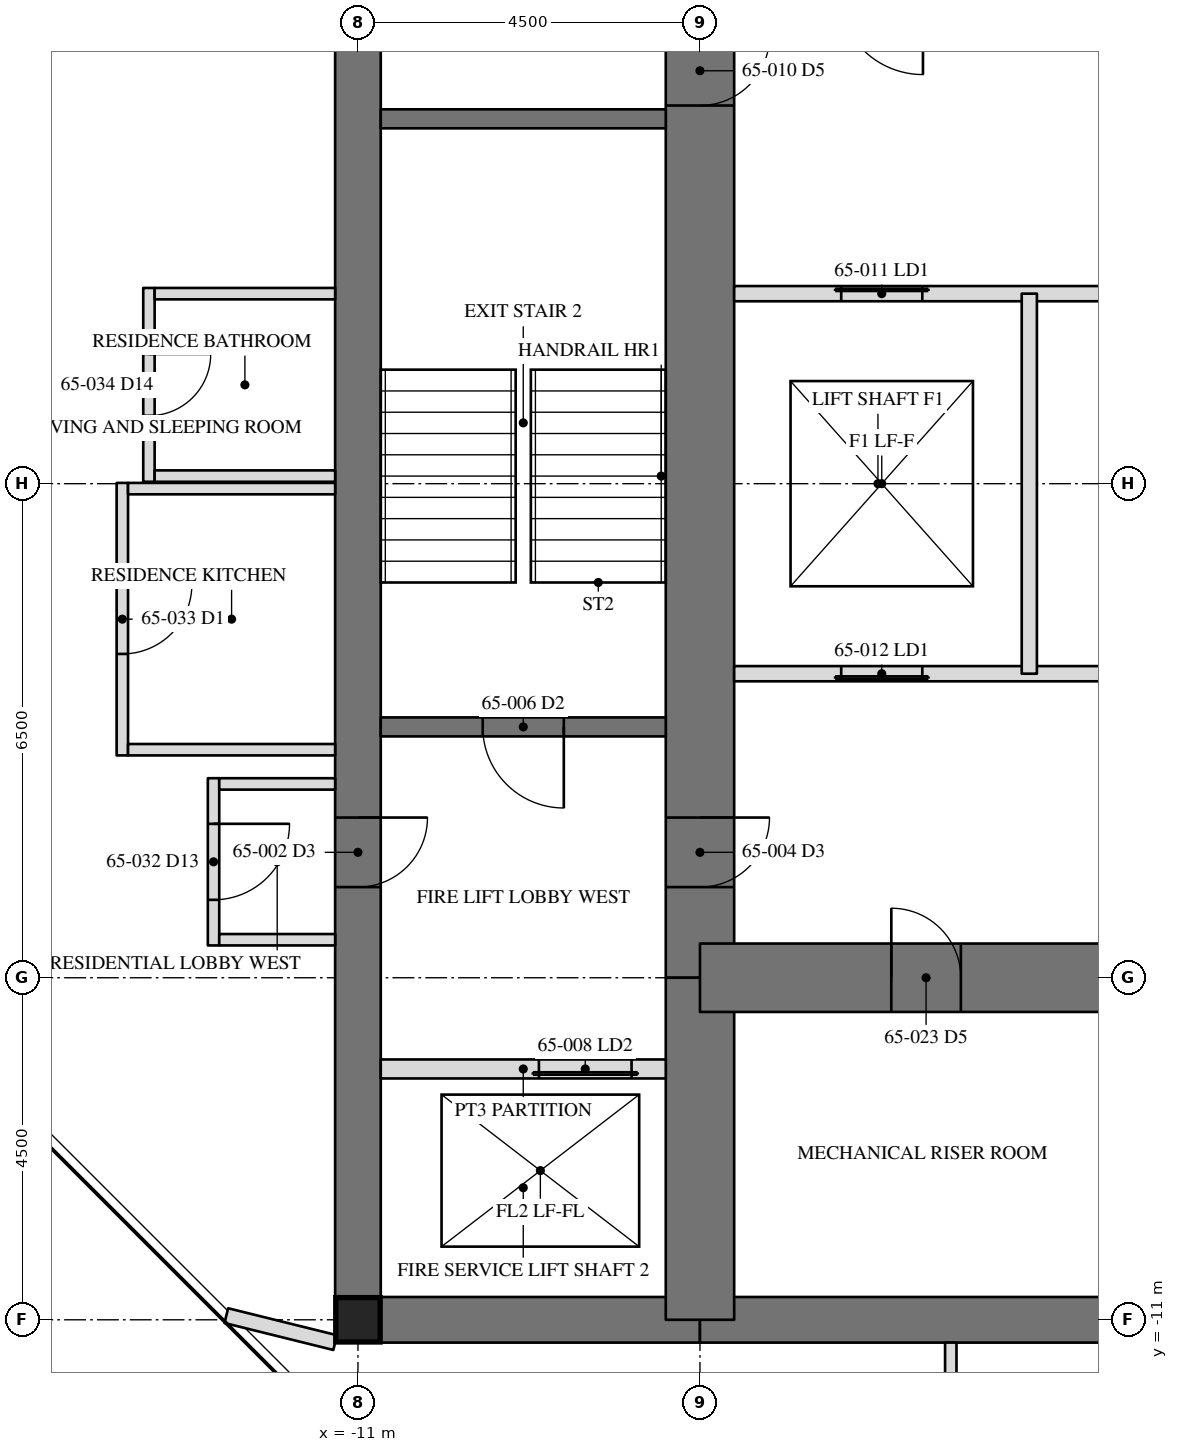
"""IFC4 building model, lengths in metres.
Left out: names, types, materials, properties, quantities, classifications, styles, units other than length and angle.
Written with IfcOpenShell. Run it as: python <this file> out.ifc"""

import sys

from ifc_helpers import new_model, si_unit, direction, frame, frame_2d, origin, origin_2d, place, context, subcontext, project, spatial, rectangle, hollow_rectangle, extrude, element, fill, save


model = new_model("IFC4")
c1 = context("Model", 3, precision=1e-05, world=origin(), true_north=direction((0.0, 1.0)))
c2 = subcontext(c1, "Body", "Model", "MODEL_VIEW")
j1 = project(units=[si_unit("LENGTHUNIT", "METRE"), si_unit("PLANEANGLEUNIT", "RADIAN")], contexts=[c1])
p1 = place(None, origin())
s1 = spatial("IfcSite", under=j1, at=p1, CompositionType="ELEMENT")
p2 = place(p1, origin())
s2 = spatial("IfcBuilding", under=s1, at=p2, CompositionType="ELEMENT")
p3 = place(p2, frame((0.0, 0.0, 266.8)))
s3 = spatial("IfcBuildingStorey", under=s2, at=p3, CompositionType="ELEMENT", Elevation=266.8)
p4 = place(p3, frame((-11.0, 11.0, 0.0), z_axis=(0.0, 0.0, 1.0), x_axis=(0.0, -1.0, 0.0)))
e1 = element("IfcWall", 1, at=p4, inside=s3, PredefinedType="SHEAR", context=c2, shape_type="SweptSolid", body=[
    extrude(rectangle(XDim=22.0, YDim=0.6, at=frame_2d((11.0, 0.0))), origin(), (0.0, 0.0, 1.0), 3.6),
])
p5 = place(p4, frame((15.393, 0.0, 0.0)))
e2 = element("IfcOpeningElement", 2, at=p5, cuts=e1, PredefinedType="OPENING", context=c2, shape_type="SweptSolid", body=[
    extrude(rectangle(XDim=0.915, YDim=2.134, at=frame_2d((0.458, 1.067))), frame((0.0, 0.31, 0.0), z_axis=(0.0, -1.0, 0.0), x_axis=(1.0, 0.0, 0.0)), (0.0, 0.0, 1.0), 0.62),
])
p6 = place(p3, frame((-11.0, -11.0, 0.0), z_axis=(0.0, 0.0, 1.0), x_axis=(1.0, 0.0, 0.0)))
e3 = element("IfcWall", 3, at=p6, inside=s3, PredefinedType="SHEAR", context=c2, shape_type="SweptSolid", body=[
    extrude(rectangle(XDim=4.5, YDim=0.6, at=frame_2d((2.25, 0.0))), origin(), (0.0, 0.0, 1.0), 3.6),
])
p7 = place(p3, frame((-6.5, -11.0, 0.0), z_axis=(0.0, 0.0, 1.0), x_axis=(1.0, 0.0, 0.0)))
e4 = element("IfcWall", 4, at=p7, inside=s3, PredefinedType="SHEAR", context=c2, shape_type="SweptSolid", body=[
    extrude(rectangle(XDim=13.0, YDim=0.6, at=frame_2d((6.5, 0.0))), origin(), (0.0, 0.0, 1.0), 3.6),
])
p8 = place(p7, frame((6.0, 0.0, 0.0)))
e5 = element("IfcOpeningElement", 5, at=p8, cuts=e4, PredefinedType="OPENING", context=c2, shape_type="SweptSolid", body=[
    extrude(rectangle(XDim=1.0, YDim=2.134, at=frame_2d((0.5, 1.067))), frame((0.0, 0.31, 0.0), z_axis=(0.0, -1.0, 0.0), x_axis=(1.0, 0.0, 0.0)), (0.0, 0.0, 1.0), 0.62),
])
p9 = place(p3, frame((-6.5, 6.5, 0.0), z_axis=(0.0, 0.0, 1.0), x_axis=(0.0, -1.0, 0.0)))
e6 = element("IfcWall", 6, at=p9, inside=s3, PredefinedType="SHEAR", context=c2, shape_type="SweptSolid", body=[
    extrude(rectangle(XDim=13.0, YDim=0.9, at=frame_2d((6.5, 0.0))), origin(), (0.0, 0.0, 1.0), 3.6),
])
p10 = place(p9, frame((10.893, 0.0, 0.0)))
e7 = element("IfcOpeningElement", 7, at=p10, cuts=e6, PredefinedType="OPENING", context=c2, shape_type="SweptSolid", body=[
    extrude(rectangle(XDim=0.915, YDim=2.134, at=frame_2d((0.458, 1.067))), frame((0.0, 0.46, 0.0), z_axis=(0.0, -1.0, 0.0), x_axis=(1.0, 0.0, 0.0)), (0.0, 0.0, 1.0), 0.92),
])
p11 = place(p9, frame((0.61, 0.0, 0.0)))
e8 = element("IfcOpeningElement", 8, at=p11, cuts=e6, PredefinedType="OPENING", context=c2, shape_type="SweptSolid", body=[
    extrude(rectangle(XDim=0.915, YDim=2.134, at=frame_2d((0.458, 1.067))), frame((0.0, 0.46, 0.0), z_axis=(0.0, -1.0, 0.0), x_axis=(1.0, 0.0, 0.0)), (0.0, 0.0, 1.0), 0.92),
])
p12 = place(p3, frame((-6.5, -6.5, 0.0), z_axis=(0.0, 0.0, 1.0), x_axis=(0.0, -1.0, 0.0)))
e9 = element("IfcWall", 9, at=p12, inside=s3, PredefinedType="SHEAR", context=c2, shape_type="SweptSolid", body=[
    extrude(rectangle(XDim=4.5, YDim=0.9, at=frame_2d((2.25, 0.0))), origin(), (0.0, 0.0, 1.0), 3.6),
])
p13 = place(p3, frame((-6.5, -6.5, 0.0), z_axis=(0.0, 0.0, 1.0), x_axis=(1.0, 0.0, 0.0)))
e10 = element("IfcWall", 10, at=p13, inside=s3, PredefinedType="SHEAR", context=c2, shape_type="SweptSolid", body=[
    extrude(rectangle(XDim=13.0, YDim=0.9, at=frame_2d((6.5, 0.0))), origin(), (0.0, 0.0, 1.0), 3.6),
])
p14 = place(p13, frame((6.042, 0.0, 0.0)))
e11 = element("IfcOpeningElement", 11, at=p14, cuts=e10, PredefinedType="OPENING", context=c2, shape_type="SweptSolid", body=[
    extrude(rectangle(XDim=0.915, YDim=2.134, at=frame_2d((0.458, 1.067))), frame((0.0, 0.46, 0.0), z_axis=(0.0, -1.0, 0.0), x_axis=(1.0, 0.0, 0.0)), (0.0, 0.0, 1.0), 0.92),
])
p15 = place(p13, frame((2.518, 0.0, 0.0)))
e12 = element("IfcOpeningElement", 12, at=p15, cuts=e10, PredefinedType="OPENING", context=c2, shape_type="SweptSolid", body=[
    extrude(rectangle(XDim=0.915, YDim=2.134, at=frame_2d((0.458, 1.067))), frame((0.0, 0.46, 0.0), z_axis=(0.0, -1.0, 0.0), x_axis=(1.0, 0.0, 0.0)), (0.0, 0.0, 1.0), 0.92),
])
p16 = place(p13, frame((10.167, 0.0, 0.0)))
e13 = element("IfcOpeningElement", 13, at=p16, cuts=e10, PredefinedType="OPENING", context=c2, shape_type="SweptSolid", body=[
    extrude(rectangle(XDim=0.915, YDim=2.134, at=frame_2d((0.458, 1.067))), frame((0.0, 0.46, 0.0), z_axis=(0.0, -1.0, 0.0), x_axis=(1.0, 0.0, 0.0)), (0.0, 0.0, 1.0), 0.92),
])
p17 = place(p3, frame((-11.0, -11.0, 0.0), z_axis=(0.0, 0.0, 1.0), x_axis=(1.0, 0.0, 0.0)))
e14 = element("IfcColumn", 14, at=p17, inside=s3, PredefinedType="COLUMN", context=c2, shape_type="SweptSolid", body=[
    extrude(hollow_rectangle(XDim=0.584, YDim=0.584, WallThickness=0.051, at=origin_2d()), origin(), (0.0, 0.0, 1.0), 3.6),
])
p18 = place(p3, frame((-6.95, 4.8, 0.0), z_axis=(0.0, 0.0, 1.0), x_axis=(-1.0, 0.0, 0.0)))
e15 = element("IfcWall", 15, at=p18, inside=s3, PredefinedType="SOLIDWALL", context=c2, shape_type="SweptSolid", body=[
    extrude(rectangle(XDim=3.75, YDim=0.25, at=frame_2d((1.875, 0.0))), origin(), (0.0, 0.0, 1.0), 3.41),
])
p19 = place(p3, frame((-6.95, -3.2, 0.0), z_axis=(0.0, 0.0, 1.0), x_axis=(-1.0, 0.0, 0.0)))
e16 = element("IfcWall", 16, at=p19, inside=s3, PredefinedType="SOLIDWALL", context=c2, shape_type="SweptSolid", body=[
    extrude(rectangle(XDim=3.75, YDim=0.25, at=frame_2d((1.875, 0.0))), origin(), (0.0, 0.0, 1.0), 3.41),
])
p20 = place(p19, frame((1.342, 0.0, 0.0)))
e17 = element("IfcOpeningElement", 17, at=p20, cuts=e16, PredefinedType="OPENING", context=c2, shape_type="SweptSolid", body=[
    extrude(rectangle(XDim=1.067, YDim=2.134, at=frame_2d((0.533, 1.067))), frame((0.0, 0.135, 0.0), z_axis=(0.0, -1.0, 0.0), x_axis=(1.0, 0.0, 0.0)), (0.0, 0.0, 1.0), 0.27),
])
p21 = place(p3, frame((-6.95, -7.7, 0.0), z_axis=(0.0, 0.0, 1.0), x_axis=(-1.0, 0.0, 0.0)))
e18 = element("IfcWall", 18, at=p21, inside=s3, PredefinedType="PARTITIONING", context=c2, shape_type="SweptSolid", body=[
    extrude(rectangle(XDim=3.75, YDim=0.25, at=frame_2d((1.875, 0.0))), origin(), (0.0, 0.0, 1.0), 3.41),
])
p22 = place(p21, frame((0.45, 0.0, 0.0)))
e19 = element("IfcOpeningElement", 19, at=p22, cuts=e18, PredefinedType="OPENING", context=c2, shape_type="SweptSolid", body=[
    extrude(rectangle(XDim=1.219, YDim=2.134, at=frame_2d((0.609, 1.067))), frame((0.0, 0.135, 0.0), z_axis=(0.0, -1.0, 0.0), x_axis=(1.0, 0.0, 0.0)), (0.0, 0.0, 1.0), 0.27),
])
p23 = place(p3, frame((-6.05, 2.5, 0.0), z_axis=(0.0, 0.0, 1.0), x_axis=(1.0, 0.0, 0.0)))
e20 = element("IfcWall", 20, at=p23, inside=s3, PredefinedType="PARTITIONING", context=c2, shape_type="SweptSolid", body=[
    extrude(rectangle(XDim=12.1, YDim=0.2, at=frame_2d((6.05, 0.0))), origin(), (0.0, 0.0, 1.0), 3.41),
])
p24 = place(p23, frame((1.408, 0.0, 0.0)))
e21 = element("IfcOpeningElement", 21, at=p24, cuts=e20, PredefinedType="OPENING", context=c2, shape_type="SweptSolid", body=[
    extrude(rectangle(XDim=1.067, YDim=2.134, at=frame_2d((0.533, 1.067))), frame((0.0, 0.11, 0.0), z_axis=(0.0, -1.0, 0.0), x_axis=(1.0, 0.0, 0.0)), (0.0, 0.0, 1.0), 0.22),
])
p25 = place(p23, frame((5.517, 0.0, 0.0)))
e22 = element("IfcOpeningElement", 22, at=p25, cuts=e20, PredefinedType="OPENING", context=c2, shape_type="SweptSolid", body=[
    extrude(rectangle(XDim=1.067, YDim=2.134, at=frame_2d((0.533, 1.067))), frame((0.0, 0.11, 0.0), z_axis=(0.0, -1.0, 0.0), x_axis=(1.0, 0.0, 0.0)), (0.0, 0.0, 1.0), 0.22),
])
p26 = place(p23, frame((9.625, 0.0, 0.0)))
e23 = element("IfcOpeningElement", 23, at=p26, cuts=e20, PredefinedType="OPENING", context=c2, shape_type="SweptSolid", body=[
    extrude(rectangle(XDim=1.067, YDim=2.134, at=frame_2d((0.533, 1.067))), frame((0.0, 0.11, 0.0), z_axis=(0.0, -1.0, 0.0), x_axis=(1.0, 0.0, 0.0)), (0.0, 0.0, 1.0), 0.22),
])
p27 = place(p3, frame((6.05, -2.5, 0.0), z_axis=(0.0, 0.0, 1.0), x_axis=(-1.0, 0.0, 0.0)))
e24 = element("IfcWall", 24, at=p27, inside=s3, PredefinedType="PARTITIONING", context=c2, shape_type="SweptSolid", body=[
    extrude(rectangle(XDim=12.1, YDim=0.2, at=frame_2d((6.05, 0.0))), origin(), (0.0, 0.0, 1.0), 3.41),
])
p28 = place(p27, frame((9.625, 0.0, 0.0)))
e25 = element("IfcOpeningElement", 25, at=p28, cuts=e24, PredefinedType="OPENING", context=c2, shape_type="SweptSolid", body=[
    extrude(rectangle(XDim=1.067, YDim=2.134, at=frame_2d((0.533, 1.067))), frame((0.0, 0.11, 0.0), z_axis=(0.0, -1.0, 0.0), x_axis=(1.0, 0.0, 0.0)), (0.0, 0.0, 1.0), 0.22),
])
p29 = place(p27, frame((5.517, 0.0, 0.0)))
e26 = element("IfcOpeningElement", 26, at=p29, cuts=e24, PredefinedType="OPENING", context=c2, shape_type="SweptSolid", body=[
    extrude(rectangle(XDim=1.067, YDim=2.134, at=frame_2d((0.533, 1.067))), frame((0.0, 0.11, 0.0), z_axis=(0.0, -1.0, 0.0), x_axis=(1.0, 0.0, 0.0)), (0.0, 0.0, 1.0), 0.22),
])
p30 = place(p27, frame((1.408, 0.0, 0.0)))
e27 = element("IfcOpeningElement", 27, at=p30, cuts=e24, PredefinedType="OPENING", context=c2, shape_type="SweptSolid", body=[
    extrude(rectangle(XDim=1.067, YDim=2.134, at=frame_2d((0.533, 1.067))), frame((0.0, 0.11, 0.0), z_axis=(0.0, -1.0, 0.0), x_axis=(1.0, 0.0, 0.0)), (0.0, 0.0, 1.0), 0.22),
])
p31 = place(p3, frame((-2.167, -2.5, 0.0), z_axis=(0.0, 0.0, 1.0), x_axis=(0.0, 1.0, 0.0)))
e28 = element("IfcWall", 28, at=p31, inside=s3, PredefinedType="PARTITIONING", context=c2, shape_type="SweptSolid", body=[
    extrude(rectangle(XDim=5.0, YDim=0.2, at=frame_2d((2.5, 0.0))), origin(), (0.0, 0.0, 1.0), 3.41),
])
p32 = place(p3, frame((-11.3, -11.3, 0.0), z_axis=(0.0, 0.0, 1.0), x_axis=(-0.970646702169, 0.24050983258, 0.0)))
e29 = element("IfcWall", 29, at=p32, inside=s3, PredefinedType="PARTITIONING", context=c2, shape_type="SweptSolid", body=[
    extrude(rectangle(XDim=1.475, YDim=0.2, at=frame_2d((0.737, 0.0))), origin(), (0.0, 0.0, 1.0), 3.41),
])
p33 = place(p3, frame((-12.9, -3.875, 0.0), z_axis=(0.0, 0.0, 1.0), x_axis=(0.0, -1.0, 0.0)))
e30 = element("IfcWall", 30, at=p33, inside=s3, PredefinedType="PARTITIONING", context=c2, shape_type="SweptSolid", body=[
    extrude(rectangle(XDim=2.2, YDim=0.15, at=frame_2d((1.1, 0.0))), origin(), (0.0, 0.0, 1.0), 3.41),
])
p34 = place(p33, frame((0.6, 0.0, 0.0)))
e31 = element("IfcOpeningElement", 31, at=p34, cuts=e30, PredefinedType="OPENING", context=c2, shape_type="SweptSolid", body=[
    extrude(rectangle(XDim=1.0, YDim=2.134, at=frame_2d((0.5, 1.067))), frame((0.0, 0.085, 0.0), z_axis=(0.0, -1.0, 0.0), x_axis=(1.0, 0.0, 0.0)), (0.0, 0.0, 1.0), 0.17),
])
for number, where, z_axis, x_axis in (
    (32, (-11.3, -3.95, 0.0), (0.0, 0.0, 1.0), (-1.0, 0.0, 0.0)),
    (33, (-11.3, -6.0, 0.0), (0.0, 0.0, 1.0), (-1.0, 0.0, 0.0)),
):
    element("IfcWall", number, at=place(p3, frame(where, z_axis=z_axis, x_axis=x_axis)), inside=s3, PredefinedType="PARTITIONING", context=c2, shape_type="SweptSolid", body=[
        extrude(rectangle(XDim=1.525, YDim=0.15, at=frame_2d((0.762, 0.0))), origin(), (0.0, 0.0, 1.0), 3.41),
    ])
p35 = place(p3, frame((-14.1, 0.01, 0.0), z_axis=(0.0, 0.0, 1.0), x_axis=(0.0, -1.0, 0.0)))
e34 = element("IfcWall", 34, at=p35, inside=s3, PredefinedType="PARTITIONING", context=c2, shape_type="SweptSolid", body=[
    extrude(rectangle(XDim=3.585, YDim=0.15, at=frame_2d((1.792, 0.0))), origin(), (0.0, 0.0, 1.0), 3.41),
])
p36 = place(p35, frame((1.335, 0.0, 0.0)))
e35 = element("IfcOpeningElement", 35, at=p36, cuts=e34, PredefinedType="OPENING", context=c2, shape_type="SweptSolid", body=[
    extrude(rectangle(XDim=0.915, YDim=2.134, at=frame_2d((0.458, 1.067))), frame((0.0, 0.085, 0.0), z_axis=(0.0, -1.0, 0.0), x_axis=(1.0, 0.0, 0.0)), (0.0, 0.0, 1.0), 0.17),
])
p37 = place(p3, frame((-11.3, -0.065, 0.0), z_axis=(0.0, 0.0, 1.0), x_axis=(-1.0, 0.0, 0.0)))
e36 = element("IfcWall", 36, at=p37, inside=s3, PredefinedType="PARTITIONING", context=c2, shape_type="SweptSolid", body=[
    extrude(rectangle(XDim=2.725, YDim=0.15, at=frame_2d((1.362, 0.0))), origin(), (0.0, 0.0, 1.0), 2.709),
])
p38 = place(p3, frame((-11.3, -3.5, 0.0), z_axis=(0.0, 0.0, 1.0), x_axis=(-1.0, 0.0, 0.0)))
e37 = element("IfcWall", 37, at=p38, inside=s3, PredefinedType="PARTITIONING", context=c2, shape_type="SweptSolid", body=[
    extrude(rectangle(XDim=2.725, YDim=0.15, at=frame_2d((1.362, 0.0))), origin(), (0.0, 0.0, 1.0), 3.41),
])
p39 = place(p3, frame((-13.75, 2.575, 0.0), z_axis=(0.0, 0.0, 1.0), x_axis=(0.0, -1.0, 0.0)))
e38 = element("IfcWall", 38, at=p39, inside=s3, PredefinedType="PARTITIONING", context=c2, shape_type="SweptSolid", body=[
    extrude(rectangle(XDim=2.55, YDim=0.15, at=frame_2d((1.275, 0.0))), origin(), (0.0, 0.0, 1.0), 3.41),
])
p40 = place(p39, frame((0.868, 0.0, 0.0)))
e39 = element("IfcOpeningElement", 39, at=p40, cuts=e38, PredefinedType="OPENING", context=c2, shape_type="SweptSolid", body=[
    extrude(rectangle(XDim=0.813, YDim=2.032, at=frame_2d((0.406, 1.016))), frame((0.0, 0.085, 0.0), z_axis=(0.0, -1.0, 0.0), x_axis=(1.0, 0.0, 0.0)), (0.0, 0.0, 1.0), 0.17),
])
p41 = place(p3, frame((-11.3, 2.5, 0.0), z_axis=(0.0, 0.0, 1.0), x_axis=(-1.0, 0.0, 0.0)))
e40 = element("IfcWall", 40, at=p41, inside=s3, PredefinedType="PARTITIONING", context=c2, shape_type="SweptSolid", body=[
    extrude(rectangle(XDim=2.375, YDim=0.15, at=frame_2d((1.188, 0.0))), origin(), (0.0, 0.0, 1.0), 3.41),
])
for number, where, z_axis, x_axis in (
    (41, (-11.3, 0.1, 0.0), (0.0, 0.0, 1.0), (-1.0, 0.0, 0.0)),
    (42, (-3.2, -11.3, 0.0), (0.0, 0.0, 1.0), (0.0, -1.0, 0.0)),
):
    element("IfcWall", number, at=place(p3, frame(where, z_axis=z_axis, x_axis=x_axis)), inside=s3, PredefinedType="PARTITIONING", context=c2, shape_type="SweptSolid", body=[
        extrude(rectangle(XDim=2.375, YDim=0.15, at=frame_2d((1.188, 0.0))), origin(), (0.0, 0.0, 1.0), 2.709),
    ])
p42 = place(p5, origin())
e43 = element("IfcDoor", 43, at=p42, inside=s3, OperationType="SINGLE_SWING_RIGHT", PredefinedType="DOOR", context=c2, shape_type="SweptSolid", body=[
    extrude(rectangle(XDim=0.915, YDim=2.134, at=frame_2d((0.458, 1.067))), frame((0.0, -0.225, 0.0), z_axis=(0.0, -1.0, 0.0), x_axis=(1.0, 0.0, 0.0)), (0.0, 0.0, 1.0), 0.05),
])
fill(e2, e43)
p43 = place(p10, origin())
e44 = element("IfcDoor", 44, at=p43, inside=s3, OperationType="SINGLE_SWING_RIGHT", PredefinedType="DOOR", context=c2, shape_type="SweptSolid", body=[
    extrude(rectangle(XDim=0.915, YDim=2.134, at=frame_2d((0.458, 1.067))), frame((0.0, -0.375, 0.0), z_axis=(0.0, -1.0, 0.0), x_axis=(1.0, 0.0, 0.0)), (0.0, 0.0, 1.0), 0.05),
])
fill(e7, e44)
p44 = place(p20, origin())
e45 = element("IfcDoor", 45, at=p44, inside=s3, OperationType="SINGLE_SWING_LEFT", PredefinedType="DOOR", context=c2, shape_type="SweptSolid", body=[
    extrude(rectangle(XDim=1.067, YDim=2.134, at=frame_2d((0.533, 1.067))), frame((0.0, 0.025, 0.0), z_axis=(0.0, -1.0, 0.0), x_axis=(1.0, 0.0, 0.0)), (0.0, 0.0, 1.0), 0.05),
])
fill(e17, e45)
p45 = place(p22, origin())
e46 = element("IfcDoor", 46, at=p45, inside=s3, OperationType="SLIDING_TO_LEFT", PredefinedType="DOOR", context=c2, shape_type="SweptSolid", body=[
    extrude(rectangle(XDim=1.219, YDim=2.134, at=frame_2d((0.609, 1.067))), frame((0.0, 0.025, 0.0), z_axis=(0.0, -1.0, 0.0), x_axis=(1.0, 0.0, 0.0)), (0.0, 0.0, 1.0), 0.05),
])
fill(e19, e46)
p46 = place(p11, origin())
e47 = element("IfcDoor", 47, at=p46, inside=s3, OperationType="SINGLE_SWING_RIGHT", PredefinedType="DOOR", context=c2, shape_type="SweptSolid", body=[
    extrude(rectangle(XDim=0.915, YDim=2.134, at=frame_2d((0.458, 1.067))), frame((0.0, -0.375, 0.0), z_axis=(0.0, -1.0, 0.0), x_axis=(1.0, 0.0, 0.0)), (0.0, 0.0, 1.0), 0.05),
])
fill(e8, e47)
p47 = place(p24, origin())
e48 = element("IfcDoor", 48, at=p47, inside=s3, OperationType="SLIDING_TO_LEFT", PredefinedType="DOOR", context=c2, shape_type="SweptSolid", body=[
    extrude(rectangle(XDim=1.067, YDim=2.134, at=frame_2d((0.533, 1.067))), frame((0.0, 0.025, 0.0), z_axis=(0.0, -1.0, 0.0), x_axis=(1.0, 0.0, 0.0)), (0.0, 0.0, 1.0), 0.05),
])
fill(e21, e48)
p48 = place(p28, origin())
e49 = element("IfcDoor", 49, at=p48, inside=s3, OperationType="SLIDING_TO_LEFT", PredefinedType="DOOR", context=c2, shape_type="SweptSolid", body=[
    extrude(rectangle(XDim=1.067, YDim=2.134, at=frame_2d((0.533, 1.067))), frame((0.0, 0.025, 0.0), z_axis=(0.0, -1.0, 0.0), x_axis=(1.0, 0.0, 0.0)), (0.0, 0.0, 1.0), 0.05),
])
fill(e25, e49)
p49 = place(p15, origin())
e50 = element("IfcDoor", 50, at=p49, inside=s3, OperationType="SINGLE_SWING_RIGHT", PredefinedType="DOOR", context=c2, shape_type="SweptSolid", body=[
    extrude(rectangle(XDim=0.915, YDim=2.134, at=frame_2d((0.458, 1.067))), frame((0.0, -0.375, 0.0), z_axis=(0.0, -1.0, 0.0), x_axis=(1.0, 0.0, 0.0)), (0.0, 0.0, 1.0), 0.05),
])
fill(e12, e50)
p50 = place(p34, origin())
e51 = element("IfcDoor", 51, at=p50, inside=s3, OperationType="SINGLE_SWING_RIGHT", PredefinedType="DOOR", context=c2, shape_type="SweptSolid", body=[
    extrude(rectangle(XDim=1.0, YDim=2.134, at=frame_2d((0.5, 1.067))), frame((0.0, 0.025, 0.0), z_axis=(0.0, -1.0, 0.0), x_axis=(1.0, 0.0, 0.0)), (0.0, 0.0, 1.0), 0.05),
])
fill(e31, e51)
p51 = place(p36, origin())
e52 = element("IfcDoor", 52, at=p51, inside=s3, OperationType="SINGLE_SWING_LEFT", PredefinedType="DOOR", context=c2, shape_type="SweptSolid", body=[
    extrude(rectangle(XDim=0.915, YDim=2.134, at=frame_2d((0.458, 1.067))), frame((0.0, 0.025, 0.0), z_axis=(0.0, -1.0, 0.0), x_axis=(1.0, 0.0, 0.0)), (0.0, 0.0, 1.0), 0.05),
])
fill(e35, e52)
p52 = place(p40, origin())
e53 = element("IfcDoor", 53, at=p52, inside=s3, OperationType="SINGLE_SWING_LEFT", PredefinedType="DOOR", context=c2, shape_type="SweptSolid", body=[
    extrude(rectangle(XDim=0.813, YDim=2.032, at=frame_2d((0.406, 1.016))), frame((0.0, 0.025, 0.0), z_axis=(0.0, -1.0, 0.0), x_axis=(1.0, 0.0, 0.0)), (0.0, 0.0, 1.0), 0.05),
])
fill(e39, e53)
save(model, sys.argv[1])
